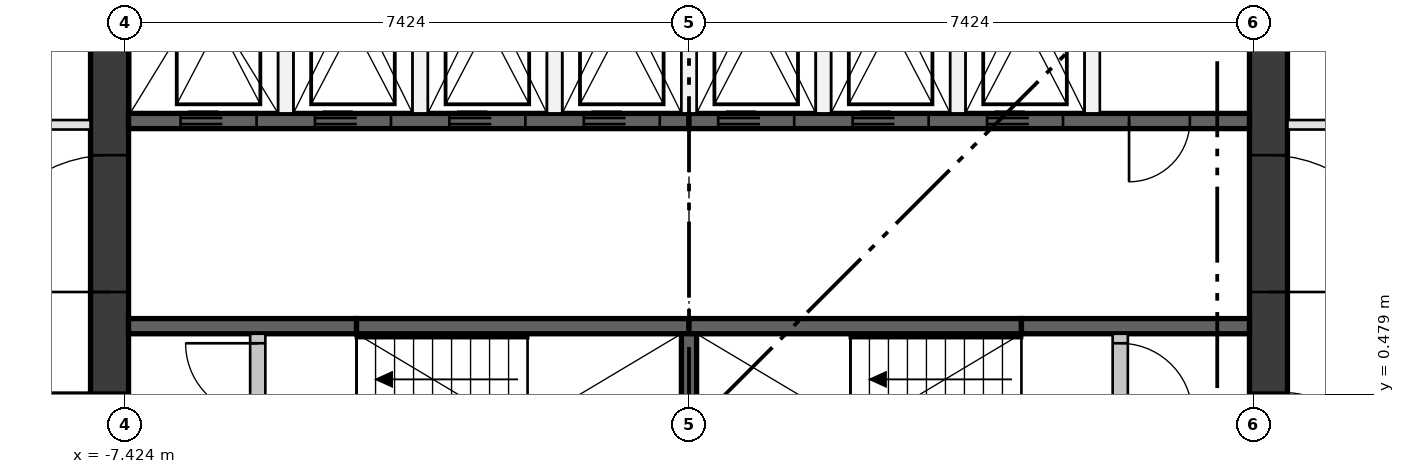
"""IFC4 building model, lengths in metres.
Left out: names, types, materials, properties, quantities, classifications, styles, units other than length and angle.
Written with IfcOpenShell. Run it as: python <this file> out.ifc"""

import sys

from ifc_helpers import new_model, si_unit, direction, frame, frame_2d, origin, place, context, subcontext, project, spatial, rectangle, extrude, element, fill, save


model = new_model("IFC4")
c1 = context("Model", 3, precision=1e-05, world=origin(), true_north=direction((0.0, 1.0)))
c2 = subcontext(c1, "Body", "Model", "MODEL_VIEW")
j1 = project(units=[si_unit("LENGTHUNIT", "METRE"), si_unit("PLANEANGLEUNIT", "RADIAN")], contexts=[c1])
p1 = place(None, origin())
s1 = spatial("IfcSite", under=j1, at=p1, CompositionType="ELEMENT")
p2 = place(p1, origin())
s2 = spatial("IfcBuilding", under=s1, at=p2, CompositionType="ELEMENT")
p3 = place(p2, frame((0.0, 0.0, 167.55)))
s3 = spatial("IfcBuildingStorey", under=s2, at=p3, CompositionType="ELEMENT", Elevation=167.55)
p4 = place(p3, frame((-7.624, -7.374, 0.0), z_axis=(0.0, 0.0, 1.0), x_axis=(0.0, 1.0, 0.0)))
e1 = element("IfcWall", 1, at=p4, inside=s3, PredefinedType="SHEAR", context=c2, shape_type="SweptSolid", body=[
    extrude(rectangle(XDim=14.748, YDim=0.5, at=frame_2d((7.374, 0.0))), origin(), (0.0, 0.0, 1.0), 3.35),
])
p5 = place(p4, frame((6.874, 0.0, 0.0)))
e2 = element("IfcOpeningElement", 2, at=p5, cuts=e1, PredefinedType="OPENING", context=c2, shape_type="SweptSolid", body=[
    extrude(rectangle(XDim=1.0, YDim=2.1, at=frame_2d((0.5, 1.05))), frame((0.0, 0.26, 0.0), z_axis=(0.0, -1.0, 0.0), x_axis=(1.0, 0.0, 0.0)), (0.0, 0.0, 1.0), 0.52),
])
p6 = place(p4, frame((3.75, 0.0, 0.0)))
e3 = element("IfcOpeningElement", 3, at=p6, cuts=e1, PredefinedType="OPENING", context=c2, shape_type="SweptSolid", body=[
    extrude(rectangle(XDim=1.8, YDim=2.1, at=frame_2d((0.9, 1.05))), frame((0.0, 0.26, 0.0), z_axis=(0.0, -1.0, 0.0), x_axis=(1.0, 0.0, 0.0)), (0.0, 0.0, 1.0), 0.52),
])
p7 = place(p4, frame((9.198, 0.0, 0.0)))
e4 = element("IfcOpeningElement", 4, at=p7, cuts=e1, PredefinedType="OPENING", context=c2, shape_type="SweptSolid", body=[
    extrude(rectangle(XDim=1.8, YDim=2.1, at=frame_2d((0.9, 1.05))), frame((0.0, 0.26, 0.0), z_axis=(0.0, -1.0, 0.0), x_axis=(1.0, 0.0, 0.0)), (0.0, 0.0, 1.0), 0.52),
])
p8 = place(p3, frame((7.624, -7.374, 0.0), z_axis=(0.0, 0.0, 1.0), x_axis=(0.0, 1.0, 0.0)))
e5 = element("IfcWall", 5, at=p8, inside=s3, PredefinedType="SHEAR", context=c2, shape_type="SweptSolid", body=[
    extrude(rectangle(XDim=14.748, YDim=0.5, at=frame_2d((7.374, 0.0))), origin(), (0.0, 0.0, 1.0), 3.35),
])
p9 = place(p8, frame((6.874, 0.0, 0.0)))
e6 = element("IfcOpeningElement", 6, at=p9, cuts=e5, PredefinedType="OPENING", context=c2, shape_type="SweptSolid", body=[
    extrude(rectangle(XDim=1.0, YDim=2.1, at=frame_2d((0.5, 1.05))), frame((0.0, 0.26, 0.0), z_axis=(0.0, -1.0, 0.0), x_axis=(1.0, 0.0, 0.0)), (0.0, 0.0, 1.0), 0.52),
])
p10 = place(p8, frame((3.75, 0.0, 0.0)))
e7 = element("IfcOpeningElement", 7, at=p10, cuts=e5, PredefinedType="OPENING", context=c2, shape_type="SweptSolid", body=[
    extrude(rectangle(XDim=1.8, YDim=2.1, at=frame_2d((0.9, 1.05))), frame((0.0, 0.26, 0.0), z_axis=(0.0, -1.0, 0.0), x_axis=(1.0, 0.0, 0.0)), (0.0, 0.0, 1.0), 0.52),
])
p11 = place(p8, frame((9.198, 0.0, 0.0)))
e8 = element("IfcOpeningElement", 8, at=p11, cuts=e5, PredefinedType="OPENING", context=c2, shape_type="SweptSolid", body=[
    extrude(rectangle(XDim=1.8, YDim=2.1, at=frame_2d((0.9, 1.05))), frame((0.0, 0.26, 0.0), z_axis=(0.0, -1.0, 0.0), x_axis=(1.0, 0.0, 0.0)), (0.0, 0.0, 1.0), 0.52),
])
p12 = place(p3, frame((-7.374, 4.074, 0.0), z_axis=(0.0, 0.0, 1.0), x_axis=(1.0, 0.0, 0.0)))
e9 = element("IfcWall", 9, at=p12, inside=s3, PredefinedType="SHEAR", context=c2, shape_type="SweptSolid", body=[
    extrude(rectangle(XDim=7.374, YDim=0.2, at=frame_2d((3.687, 0.0))), origin(), (0.0, 0.0, 1.0), 3.0),
])
p13 = place(p12, frame((0.684, 0.0, 0.0)))
e10 = element("IfcOpeningElement", 10, at=p13, cuts=e9, PredefinedType="OPENING", context=c2, shape_type="SweptSolid", body=[
    extrude(rectangle(XDim=1.0, YDim=2.1, at=frame_2d((0.5, 1.05))), frame((0.0, 0.11, 0.0), z_axis=(0.0, -1.0, 0.0), x_axis=(1.0, 0.0, 0.0)), (0.0, 0.0, 1.0), 0.22),
])
p14 = place(p12, frame((2.453, 0.0, 0.0)))
e11 = element("IfcOpeningElement", 11, at=p14, cuts=e9, PredefinedType="OPENING", context=c2, shape_type="SweptSolid", body=[
    extrude(rectangle(XDim=1.0, YDim=2.1, at=frame_2d((0.5, 1.05))), frame((0.0, 0.11, 0.0), z_axis=(0.0, -1.0, 0.0), x_axis=(1.0, 0.0, 0.0)), (0.0, 0.0, 1.0), 0.22),
])
p15 = place(p12, frame((4.221, 0.0, 0.0)))
e12 = element("IfcOpeningElement", 12, at=p15, cuts=e9, PredefinedType="OPENING", context=c2, shape_type="SweptSolid", body=[
    extrude(rectangle(XDim=1.0, YDim=2.1, at=frame_2d((0.5, 1.05))), frame((0.0, 0.11, 0.0), z_axis=(0.0, -1.0, 0.0), x_axis=(1.0, 0.0, 0.0)), (0.0, 0.0, 1.0), 0.22),
])
p16 = place(p12, frame((5.99, 0.0, 0.0)))
e13 = element("IfcOpeningElement", 13, at=p16, cuts=e9, PredefinedType="OPENING", context=c2, shape_type="SweptSolid", body=[
    extrude(rectangle(XDim=1.0, YDim=2.1, at=frame_2d((0.5, 1.05))), frame((0.0, 0.11, 0.0), z_axis=(0.0, -1.0, 0.0), x_axis=(1.0, 0.0, 0.0)), (0.0, 0.0, 1.0), 0.22),
])
p17 = place(p3, frame((0.0, 4.074, 0.0), z_axis=(0.0, 0.0, 1.0), x_axis=(1.0, 0.0, 0.0)))
e14 = element("IfcWall", 14, at=p17, inside=s3, PredefinedType="SHEAR", context=c2, shape_type="SweptSolid", body=[
    extrude(rectangle(XDim=7.374, YDim=0.2, at=frame_2d((3.687, 0.0))), origin(), (0.0, 0.0, 1.0), 3.0),
])
p18 = place(p17, frame((0.384, 0.0, 0.0)))
e15 = element("IfcOpeningElement", 15, at=p18, cuts=e14, PredefinedType="OPENING", context=c2, shape_type="SweptSolid", body=[
    extrude(rectangle(XDim=1.0, YDim=2.1, at=frame_2d((0.5, 1.05))), frame((0.0, 0.11, 0.0), z_axis=(0.0, -1.0, 0.0), x_axis=(1.0, 0.0, 0.0)), (0.0, 0.0, 1.0), 0.22),
])
p19 = place(p17, frame((2.153, 0.0, 0.0)))
e16 = element("IfcOpeningElement", 16, at=p19, cuts=e14, PredefinedType="OPENING", context=c2, shape_type="SweptSolid", body=[
    extrude(rectangle(XDim=1.0, YDim=2.1, at=frame_2d((0.5, 1.05))), frame((0.0, 0.11, 0.0), z_axis=(0.0, -1.0, 0.0), x_axis=(1.0, 0.0, 0.0)), (0.0, 0.0, 1.0), 0.22),
])
p20 = place(p17, frame((3.921, 0.0, 0.0)))
e17 = element("IfcOpeningElement", 17, at=p20, cuts=e14, PredefinedType="OPENING", context=c2, shape_type="SweptSolid", body=[
    extrude(rectangle(XDim=1.0, YDim=2.1, at=frame_2d((0.5, 1.05))), frame((0.0, 0.11, 0.0), z_axis=(0.0, -1.0, 0.0), x_axis=(1.0, 0.0, 0.0)), (0.0, 0.0, 1.0), 0.22),
])
p21 = place(p17, frame((5.79, 0.0, 0.0)))
e18 = element("IfcOpeningElement", 18, at=p21, cuts=e14, PredefinedType="OPENING", context=c2, shape_type="SweptSolid", body=[
    extrude(rectangle(XDim=0.8, YDim=2.1, at=frame_2d((0.4, 1.05))), frame((0.0, 0.11, 0.0), z_axis=(0.0, -1.0, 0.0), x_axis=(1.0, 0.0, 0.0)), (0.0, 0.0, 1.0), 0.22),
])
p22 = place(p3, frame((-7.374, 1.375, 0.0), z_axis=(0.0, 0.0, 1.0), x_axis=(1.0, 0.0, 0.0)))
e19 = element("IfcWall", 19, at=p22, inside=s3, PredefinedType="SHEAR", context=c2, shape_type="SweptSolid", body=[
    extrude(rectangle(XDim=3.0, YDim=0.2, at=frame_2d((1.5, 0.0))), origin(), (0.0, 0.0, 1.0), 3.0),
])
for number, where, z_axis, x_axis in (
    (20, (-4.374, 1.375, 0.0), (0.0, 0.0, 1.0), (1.0, 0.0, 0.0)),
    (21, (0.0, 1.375, 0.0), (0.0, 0.0, 1.0), (1.0, 0.0, 0.0)),
):
    element("IfcWall", number, at=place(p3, frame(where, z_axis=z_axis, x_axis=x_axis)), inside=s3, PredefinedType="SHEAR", context=c2, shape_type="SweptSolid", body=[
        extrude(rectangle(XDim=4.374, YDim=0.2, at=frame_2d((2.187, 0.0))), origin(), (0.0, 0.0, 1.0), 3.0),
    ])
p23 = place(p3, frame((4.374, 1.375, 0.0), z_axis=(0.0, 0.0, 1.0), x_axis=(1.0, 0.0, 0.0)))
e22 = element("IfcWall", 22, at=p23, inside=s3, PredefinedType="SHEAR", context=c2, shape_type="SweptSolid", body=[
    extrude(rectangle(XDim=3.0, YDim=0.2, at=frame_2d((1.5, 0.0))), origin(), (0.0, 0.0, 1.0), 3.0),
])
p24 = place(p3, frame((0.0, -1.275, 0.0), z_axis=(0.0, 0.0, 1.0), x_axis=(0.0, 1.0, 0.0)))
e23 = element("IfcWall", 23, at=p24, inside=s3, PredefinedType="SHEAR", context=c2, shape_type="SweptSolid", body=[
    extrude(rectangle(XDim=2.55, YDim=0.2, at=frame_2d((1.275, 0.0))), origin(), (0.0, 0.0, 1.0), 3.0),
])
for number, where, z_axis, x_axis in (
    (24, (-5.305, 4.174, 0.0), (0.0, 0.0, 1.0), (0.0, 1.0, 0.0)),
    (25, (-3.537, 4.174, 0.0), (0.0, 0.0, 1.0), (0.0, 1.0, 0.0)),
    (26, (-1.769, 4.174, 0.0), (0.0, 0.0, 1.0), (0.0, 1.0, 0.0)),
    (27, (0.0, 4.174, 0.0), (0.0, 0.0, 1.0), (0.0, 1.0, 0.0)),
    (28, (1.769, 4.174, 0.0), (0.0, 0.0, 1.0), (0.0, 1.0, 0.0)),
    (29, (3.537, 4.174, 0.0), (0.0, 0.0, 1.0), (0.0, 1.0, 0.0)),
    (30, (5.305, 4.174, 0.0), (0.0, 0.0, 1.0), (0.0, 1.0, 0.0)),
):
    element("IfcWall", number, at=place(p3, frame(where, z_axis=z_axis, x_axis=x_axis)), inside=s3, PredefinedType="PARTITIONING", context=c2, shape_type="SweptSolid", body=[
        extrude(rectangle(XDim=3.2, YDim=0.2, at=frame_2d((1.6, 0.0))), origin(), (0.0, 0.0, 1.0), 3.0),
    ])
p25 = place(p3, frame((-5.674, -1.275, 0.0), z_axis=(0.0, 0.0, 1.0), x_axis=(0.0, 1.0, 0.0)))
e31 = element("IfcWall", 31, at=p25, inside=s3, PredefinedType="PARTITIONING", context=c2, shape_type="SweptSolid", body=[
    extrude(rectangle(XDim=2.55, YDim=0.2, at=frame_2d((1.275, 0.0))), origin(), (0.0, 0.0, 1.0), 3.0),
])
p26 = place(p25, frame((0.125, 0.0, 0.0)))
e32 = element("IfcOpeningElement", 32, at=p26, cuts=e31, PredefinedType="OPENING", context=c2, shape_type="SweptSolid", body=[
    extrude(rectangle(XDim=0.95, YDim=2.1, at=frame_2d((0.475, 1.05))), frame((0.0, 0.11, 0.0), z_axis=(0.0, -1.0, 0.0), x_axis=(1.0, 0.0, 0.0)), (0.0, 0.0, 1.0), 0.22),
])
p27 = place(p25, frame((1.475, 0.0, 0.0)))
e33 = element("IfcOpeningElement", 33, at=p27, cuts=e31, PredefinedType="OPENING", context=c2, shape_type="SweptSolid", body=[
    extrude(rectangle(XDim=0.95, YDim=2.1, at=frame_2d((0.475, 1.05))), frame((0.0, 0.11, 0.0), z_axis=(0.0, -1.0, 0.0), x_axis=(1.0, 0.0, 0.0)), (0.0, 0.0, 1.0), 0.22),
])
p28 = place(p3, frame((5.674, -1.275, 0.0), z_axis=(0.0, 0.0, 1.0), x_axis=(0.0, 1.0, 0.0)))
e34 = element("IfcWall", 34, at=p28, inside=s3, PredefinedType="PARTITIONING", context=c2, shape_type="SweptSolid", body=[
    extrude(rectangle(XDim=2.55, YDim=0.2, at=frame_2d((1.275, 0.0))), origin(), (0.0, 0.0, 1.0), 3.0),
])
p29 = place(p28, frame((0.125, 0.0, 0.0)))
e35 = element("IfcOpeningElement", 35, at=p29, cuts=e34, PredefinedType="OPENING", context=c2, shape_type="SweptSolid", body=[
    extrude(rectangle(XDim=0.95, YDim=2.1, at=frame_2d((0.475, 1.05))), frame((0.0, 0.11, 0.0), z_axis=(0.0, -1.0, 0.0), x_axis=(1.0, 0.0, 0.0)), (0.0, 0.0, 1.0), 0.22),
])
p30 = place(p28, frame((1.475, 0.0, 0.0)))
e36 = element("IfcOpeningElement", 36, at=p30, cuts=e34, PredefinedType="OPENING", context=c2, shape_type="SweptSolid", body=[
    extrude(rectangle(XDim=0.95, YDim=2.1, at=frame_2d((0.475, 1.05))), frame((0.0, 0.11, 0.0), z_axis=(0.0, -1.0, 0.0), x_axis=(1.0, 0.0, 0.0)), (0.0, 0.0, 1.0), 0.22),
])
p31 = place(p3, frame((7.874, 4.024, 0.0), z_axis=(0.0, 0.0, 1.0), x_axis=(1.0, 0.0, 0.0)))
e37 = element("IfcWall", 37, at=p31, inside=s3, PredefinedType="PARTITIONING", context=c2, shape_type="SweptSolid", body=[
    extrude(rectangle(XDim=4.741, YDim=0.125, at=frame_2d((2.37, 0.0))), origin(), (0.0, 0.0, 1.0), 3.0),
])
p32 = place(p31, frame((1.5, 0.0, 0.0)))
e38 = element("IfcOpeningElement", 38, at=p32, cuts=e37, PredefinedType="OPENING", context=c2, shape_type="SweptSolid", body=[
    extrude(rectangle(XDim=1.8, YDim=2.1, at=frame_2d((0.9, 1.05))), frame((0.0, 0.073, 0.0), z_axis=(0.0, -1.0, 0.0), x_axis=(1.0, 0.0, 0.0)), (0.0, 0.0, 1.0), 0.145),
])
p33 = place(p3, frame((-12.404, 4.024, 0.0), z_axis=(0.0, 0.0, 1.0), x_axis=(1.0, 0.0, 0.0)))
e39 = element("IfcWall", 39, at=p33, inside=s3, PredefinedType="PARTITIONING", context=c2, shape_type="SweptSolid", body=[
    extrude(rectangle(XDim=4.53, YDim=0.125, at=frame_2d((2.265, 0.0))), origin(), (0.0, 0.0, 1.0), 3.0),
])
p34 = place(p33, frame((1.8, 0.0, 0.0)))
e40 = element("IfcOpeningElement", 40, at=p34, cuts=e39, PredefinedType="OPENING", context=c2, shape_type="SweptSolid", body=[
    extrude(rectangle(XDim=1.0, YDim=2.1, at=frame_2d((0.5, 1.05))), frame((0.0, 0.073, 0.0), z_axis=(0.0, -1.0, 0.0), x_axis=(1.0, 0.0, 0.0)), (0.0, 0.0, 1.0), 0.145),
])
p35 = place(p13, frame((1.0, 0.0, 0.0), z_axis=(0.0, 0.0, 1.0), x_axis=(-1.0, 0.0, 0.0)))
e41 = element("IfcDoor", 41, at=p35, inside=s3, OperationType="DOUBLE_DOOR_SLIDING", PredefinedType="DOOR", context=c2, shape_type="SweptSolid", body=[
    extrude(rectangle(XDim=1.0, YDim=2.1, at=frame_2d((0.5, 1.05))), frame((0.0, 0.025, 0.0), z_axis=(0.0, -1.0, 0.0), x_axis=(1.0, 0.0, 0.0)), (0.0, 0.0, 1.0), 0.05),
])
fill(e10, e41)
p36 = place(p14, frame((1.0, 0.0, 0.0), z_axis=(0.0, 0.0, 1.0), x_axis=(-1.0, 0.0, 0.0)))
e42 = element("IfcDoor", 42, at=p36, inside=s3, OperationType="DOUBLE_DOOR_SLIDING", PredefinedType="DOOR", context=c2, shape_type="SweptSolid", body=[
    extrude(rectangle(XDim=1.0, YDim=2.1, at=frame_2d((0.5, 1.05))), frame((0.0, 0.025, 0.0), z_axis=(0.0, -1.0, 0.0), x_axis=(1.0, 0.0, 0.0)), (0.0, 0.0, 1.0), 0.05),
])
fill(e11, e42)
p37 = place(p15, frame((1.0, 0.0, 0.0), z_axis=(0.0, 0.0, 1.0), x_axis=(-1.0, 0.0, 0.0)))
e43 = element("IfcDoor", 43, at=p37, inside=s3, OperationType="DOUBLE_DOOR_SLIDING", PredefinedType="DOOR", context=c2, shape_type="SweptSolid", body=[
    extrude(rectangle(XDim=1.0, YDim=2.1, at=frame_2d((0.5, 1.05))), frame((0.0, 0.025, 0.0), z_axis=(0.0, -1.0, 0.0), x_axis=(1.0, 0.0, 0.0)), (0.0, 0.0, 1.0), 0.05),
])
fill(e12, e43)
p38 = place(p16, frame((1.0, 0.0, 0.0), z_axis=(0.0, 0.0, 1.0), x_axis=(-1.0, 0.0, 0.0)))
e44 = element("IfcDoor", 44, at=p38, inside=s3, OperationType="DOUBLE_DOOR_SLIDING", PredefinedType="DOOR", context=c2, shape_type="SweptSolid", body=[
    extrude(rectangle(XDim=1.0, YDim=2.1, at=frame_2d((0.5, 1.05))), frame((0.0, 0.025, 0.0), z_axis=(0.0, -1.0, 0.0), x_axis=(1.0, 0.0, 0.0)), (0.0, 0.0, 1.0), 0.05),
])
fill(e13, e44)
p39 = place(p18, frame((1.0, 0.0, 0.0), z_axis=(0.0, 0.0, 1.0), x_axis=(-1.0, 0.0, 0.0)))
e45 = element("IfcDoor", 45, at=p39, inside=s3, OperationType="DOUBLE_DOOR_SLIDING", PredefinedType="DOOR", context=c2, shape_type="SweptSolid", body=[
    extrude(rectangle(XDim=1.0, YDim=2.1, at=frame_2d((0.5, 1.05))), frame((0.0, 0.025, 0.0), z_axis=(0.0, -1.0, 0.0), x_axis=(1.0, 0.0, 0.0)), (0.0, 0.0, 1.0), 0.05),
])
fill(e15, e45)
p40 = place(p19, frame((1.0, 0.0, 0.0), z_axis=(0.0, 0.0, 1.0), x_axis=(-1.0, 0.0, 0.0)))
e46 = element("IfcDoor", 46, at=p40, inside=s3, OperationType="DOUBLE_DOOR_SLIDING", PredefinedType="DOOR", context=c2, shape_type="SweptSolid", body=[
    extrude(rectangle(XDim=1.0, YDim=2.1, at=frame_2d((0.5, 1.05))), frame((0.0, 0.025, 0.0), z_axis=(0.0, -1.0, 0.0), x_axis=(1.0, 0.0, 0.0)), (0.0, 0.0, 1.0), 0.05),
])
fill(e16, e46)
p41 = place(p20, frame((1.0, 0.0, 0.0), z_axis=(0.0, 0.0, 1.0), x_axis=(-1.0, 0.0, 0.0)))
e47 = element("IfcDoor", 47, at=p41, inside=s3, OperationType="DOUBLE_DOOR_SLIDING", PredefinedType="DOOR", context=c2, shape_type="SweptSolid", body=[
    extrude(rectangle(XDim=1.0, YDim=2.1, at=frame_2d((0.5, 1.05))), frame((0.0, 0.025, 0.0), z_axis=(0.0, -1.0, 0.0), x_axis=(1.0, 0.0, 0.0)), (0.0, 0.0, 1.0), 0.05),
])
fill(e17, e47)
p42 = place(p27, origin())
e48 = element("IfcDoor", 48, at=p42, inside=s3, OperationType="SINGLE_SWING_RIGHT", PredefinedType="DOOR", context=c2, shape_type="SweptSolid", body=[
    extrude(rectangle(XDim=0.95, YDim=2.1, at=frame_2d((0.475, 1.05))), frame((0.0, 0.025, 0.0), z_axis=(0.0, -1.0, 0.0), x_axis=(1.0, 0.0, 0.0)), (0.0, 0.0, 1.0), 0.05),
])
fill(e33, e48)
p43 = place(p30, frame((0.95, 0.0, 0.0), z_axis=(0.0, 0.0, 1.0), x_axis=(-1.0, 0.0, 0.0)))
e49 = element("IfcDoor", 49, at=p43, inside=s3, OperationType="SINGLE_SWING_LEFT", PredefinedType="DOOR", context=c2, shape_type="SweptSolid", body=[
    extrude(rectangle(XDim=0.95, YDim=2.1, at=frame_2d((0.475, 1.05))), frame((0.0, 0.025, 0.0), z_axis=(0.0, -1.0, 0.0), x_axis=(1.0, 0.0, 0.0)), (0.0, 0.0, 1.0), 0.05),
])
fill(e36, e49)
p44 = place(p21, frame((0.8, 0.0, 0.0), z_axis=(0.0, 0.0, 1.0), x_axis=(-1.0, 0.0, 0.0)))
e50 = element("IfcDoor", 50, at=p44, inside=s3, OperationType="SINGLE_SWING_LEFT", PredefinedType="DOOR", context=c2, shape_type="SweptSolid", body=[
    extrude(rectangle(XDim=0.8, YDim=2.1, at=frame_2d((0.4, 1.05))), frame((0.0, 0.025, 0.0), z_axis=(0.0, -1.0, 0.0), x_axis=(1.0, 0.0, 0.0)), (0.0, 0.0, 1.0), 0.05),
])
fill(e18, e50)
p45 = place(p5, origin())
e51 = element("IfcDoor", 51, at=p45, inside=s3, OperationType="SINGLE_SWING_RIGHT", PredefinedType="DOOR", context=c2, shape_type="SweptSolid", body=[
    extrude(rectangle(XDim=1.0, YDim=2.1, at=frame_2d((0.5, 1.05))), frame((0.0, 0.25, 0.0), z_axis=(0.0, -1.0, 0.0), x_axis=(1.0, 0.0, 0.0)), (0.0, 0.0, 1.0), 0.05),
])
fill(e2, e51)
p46 = place(p7, origin())
e52 = element("IfcDoor", 52, at=p46, inside=s3, OperationType="DOUBLE_DOOR_SINGLE_SWING", PredefinedType="DOOR", context=c2, shape_type="SweptSolid", body=[
    extrude(rectangle(XDim=1.8, YDim=2.1, at=frame_2d((0.9, 1.05))), frame((0.0, 0.025, 0.0), z_axis=(0.0, -1.0, 0.0), x_axis=(1.0, 0.0, 0.0)), (0.0, 0.0, 1.0), 0.05),
])
fill(e4, e52)
p47 = place(p9, frame((1.0, 0.0, 0.0), z_axis=(0.0, 0.0, 1.0), x_axis=(-1.0, 0.0, 0.0)))
e53 = element("IfcDoor", 53, at=p47, inside=s3, OperationType="SINGLE_SWING_LEFT", PredefinedType="DOOR", context=c2, shape_type="SweptSolid", body=[
    extrude(rectangle(XDim=1.0, YDim=2.1, at=frame_2d((0.5, 1.05))), frame((0.0, 0.25, 0.0), z_axis=(0.0, -1.0, 0.0), x_axis=(1.0, 0.0, 0.0)), (0.0, 0.0, 1.0), 0.05),
])
fill(e6, e53)
p48 = place(p11, frame((1.8, 0.0, 0.0), z_axis=(0.0, 0.0, 1.0), x_axis=(-1.0, 0.0, 0.0)))
e54 = element("IfcDoor", 54, at=p48, inside=s3, OperationType="DOUBLE_DOOR_SINGLE_SWING", PredefinedType="DOOR", context=c2, shape_type="SweptSolid", body=[
    extrude(rectangle(XDim=1.8, YDim=2.1, at=frame_2d((0.9, 1.05))), frame((0.0, 0.025, 0.0), z_axis=(0.0, -1.0, 0.0), x_axis=(1.0, 0.0, 0.0)), (0.0, 0.0, 1.0), 0.05),
])
fill(e8, e54)
save(model, sys.argv[1])
